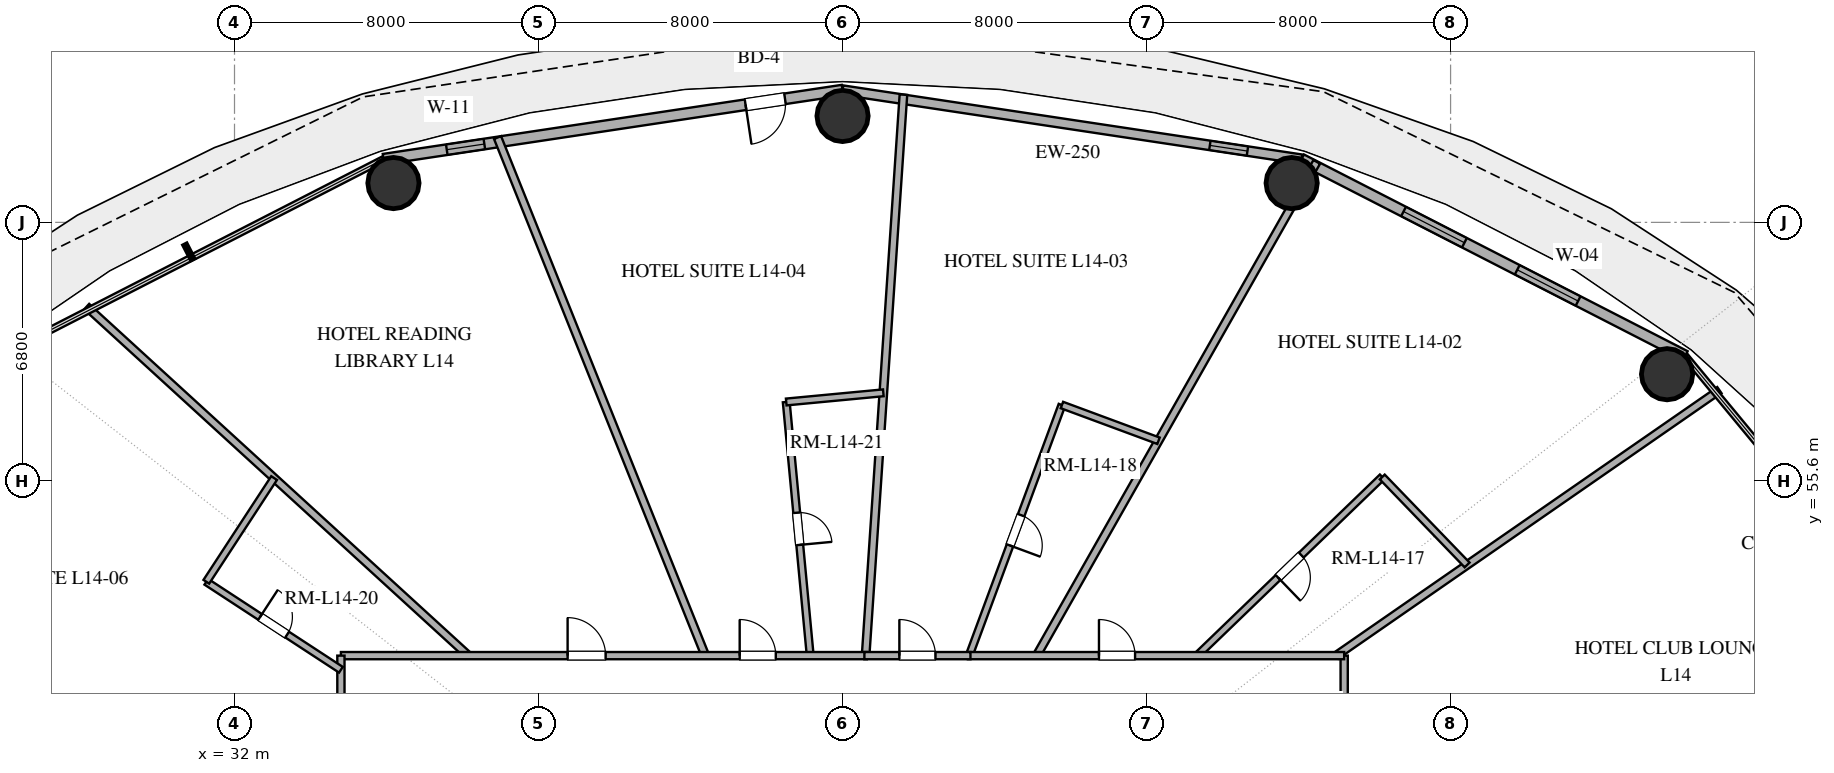
"""IFC4 building model, lengths in metres.
Left out: names, types, materials, properties, quantities, classifications, styles, units other than length and angle.
Written with IfcOpenShell. Run it as: python <this file> out.ifc"""

import sys

from ifc_helpers import new_model, si_unit, direction, frame, frame_2d, origin, origin_2d, place, context, subcontext, project, spatial, rectangle, hollow_circle, extrude, element, fill, save


model = new_model("IFC4")
c1 = context("Model", 3, precision=1e-05, world=origin(), true_north=direction((0.0, 1.0)))
c2 = subcontext(c1, "Body", "Model", "MODEL_VIEW")
j1 = project(units=[si_unit("LENGTHUNIT", "METRE"), si_unit("PLANEANGLEUNIT", "RADIAN")], contexts=[c1])
p1 = place(None, origin())
s1 = spatial("IfcSite", under=j1, at=p1, CompositionType="ELEMENT")
p2 = place(p1, origin())
s2 = spatial("IfcBuilding", under=s1, at=p2, CompositionType="ELEMENT")
p3 = place(p2, frame((0.0, 0.0, 60.6)))
s3 = spatial("IfcBuildingStorey", under=s2, at=p3, CompositionType="ELEMENT", Elevation=60.6)
for number, where, z_axis, x_axis in (
    (1, (69.697, 58.405, 0.0), (0.0, 0.0, 1.0), (1.0, 0.0, 0.0)),
    (2, (59.818, 63.434, 0.0), (0.0, 0.0, 1.0), (1.0, 0.0, 0.0)),
    (3, (48.0, 65.2, 0.0), (0.0, 0.0, 1.0), (1.0, 0.0, 0.0)),
    (4, (36.182, 63.434, 0.0), (0.0, 0.0, 1.0), (1.0, 0.0, 0.0)),
):
    element("IfcColumn", number, at=place(p3, frame(where, z_axis=z_axis, x_axis=x_axis)), inside=s3, PredefinedType="COLUMN", context=c2, shape_type="SweptSolid", body=[
        extrude(hollow_circle(Radius=0.675, WallThickness=0.036, at=origin_2d()), origin(), (0.0, 0.0, 1.0), 3.38),
    ])
p4 = place(p3, frame((70.174, 58.886, 0.0), z_axis=(0.0, 0.0, 1.0), x_axis=(-0.889853976658, 0.456245438581, 0.0)))
e5 = element("IfcWall", 5, at=p4, inside=s3, PredefinedType="SOLIDWALL", context=c2, shape_type="SweptSolid", body=[
    extrude(rectangle(XDim=11.346, YDim=0.28, at=frame_2d((5.673, 0.0))), origin(), (0.0, 0.0, 1.0), 3.38),
])
p5 = place(p4, frame((3.167, 0.0, 0.85)))
e6 = element("IfcOpeningElement", 6, at=p5, cuts=e5, PredefinedType="OPENING", context=c2, shape_type="SweptSolid", body=[
    extrude(rectangle(XDim=1.8, YDim=2.2, at=frame_2d((0.9, 1.1))), frame((0.0, 0.15, 0.0), z_axis=(0.0, -1.0, 0.0), x_axis=(1.0, 0.0, 0.0)), (0.0, 0.0, 1.0), 0.3),
])
p6 = place(p4, frame((6.529, 0.0, 0.85)))
e7 = element("IfcOpeningElement", 7, at=p6, cuts=e5, PredefinedType="OPENING", context=c2, shape_type="SweptSolid", body=[
    extrude(rectangle(XDim=1.8, YDim=2.2, at=frame_2d((0.9, 1.1))), frame((0.0, 0.15, 0.0), z_axis=(0.0, -1.0, 0.0), x_axis=(1.0, 0.0, 0.0)), (0.0, 0.0, 1.0), 0.3),
])
p7 = place(p3, frame((60.078, 64.062, 0.0), z_axis=(0.0, 0.0, 1.0), x_axis=(-0.988864835849, 0.148816452121, 0.0)))
e8 = element("IfcWall", 8, at=p7, inside=s3, PredefinedType="SOLIDWALL", context=c2, shape_type="SweptSolid", body=[
    extrude(rectangle(XDim=12.214, YDim=0.25, at=frame_2d((6.107, 0.0))), origin(), (0.0, 0.0, 1.0), 3.38),
])
p8 = place(p7, frame((1.439, 0.0, 1.42)))
e9 = element("IfcOpeningElement", 9, at=p8, cuts=e8, PredefinedType="OPENING", context=c2, shape_type="SweptSolid", body=[
    extrude(rectangle(XDim=1.0, YDim=1.05, at=frame_2d((0.5, 0.525))), frame((0.0, 0.135, 0.0), z_axis=(0.0, -1.0, 0.0), x_axis=(1.0, 0.0, 0.0)), (0.0, 0.0, 1.0), 0.27),
])
p9 = place(p3, frame((48.0, 65.88, 0.0), z_axis=(0.0, 0.0, 1.0), x_axis=(-0.988864835849, -0.148816452121, 0.0)))
e10 = element("IfcWall", 10, at=p9, inside=s3, PredefinedType="SOLIDWALL", context=c2, shape_type="SweptSolid", body=[
    extrude(rectangle(XDim=12.214, YDim=0.28, at=frame_2d((6.107, 0.0))), origin(), (0.0, 0.0, 1.0), 3.38),
])
p10 = place(p9, frame((1.531, 0.0, 0.0)))
e11 = element("IfcOpeningElement", 11, at=p10, cuts=e10, PredefinedType="OPENING", context=c2, shape_type="SweptSolid", body=[
    extrude(rectangle(XDim=1.05, YDim=2.2, at=frame_2d((0.525, 1.1))), frame((0.0, 0.15, 0.0), z_axis=(0.0, -1.0, 0.0), x_axis=(1.0, 0.0, 0.0)), (0.0, 0.0, 1.0), 0.3),
])
p11 = place(p9, frame((9.531, 0.0, 0.85)))
e12 = element("IfcOpeningElement", 12, at=p11, cuts=e10, PredefinedType="OPENING", context=c2, shape_type="SweptSolid", body=[
    extrude(rectangle(XDim=1.0, YDim=1.8, at=frame_2d((0.5, 0.9))), frame((0.0, 0.15, 0.0), z_axis=(0.0, -1.0, 0.0), x_axis=(1.0, 0.0, 0.0)), (0.0, 0.0, 1.0), 0.3),
])
p12 = place(p3, frame((44.39, 51.0, 0.0), z_axis=(0.0, 0.0, 1.0), x_axis=(-0.372301847193, 0.928111703717, 0.0)))
e13 = element("IfcWall", 13, at=p12, inside=s3, PredefinedType="PARTITIONING", context=c2, shape_type="SweptSolid", body=[
    extrude(rectangle(XDim=14.688, YDim=0.2, at=frame_2d((7.344, 0.0))), origin(), (0.0, 0.0, 1.0), 2.74),
])
p13 = place(p3, frame((19.184, 50.653, 0.0), z_axis=(0.0, 0.0, 1.0), x_axis=(0.957749889613, -0.287602414708, 0.0)))
e14 = element("IfcWall", 14, at=p13, inside=s3, PredefinedType="PARTITIONING", context=c2, shape_type="SweptSolid", body=[
    extrude(rectangle(XDim=8.8, YDim=0.2, at=frame_2d((4.4, 0.0))), origin(), (0.0, 0.0, 1.0), 2.74),
])
p14 = place(p3, frame((53.107, 51.0, 0.0), z_axis=(0.0, 0.0, 1.0), x_axis=(0.493512300658, 0.869738816599, 0.0)))
e15 = element("IfcWall", 15, at=p14, inside=s3, PredefinedType="PARTITIONING", context=c2, shape_type="SweptSolid", body=[
    extrude(rectangle(XDim=14.938, YDim=0.2, at=frame_2d((7.469, 0.0))), origin(), (0.0, 0.0, 1.0), 2.74),
])
p15 = place(p3, frame((60.991, 51.0, 0.0), z_axis=(0.0, 0.0, 1.0), x_axis=(0.821999402566, 0.569488351226, 0.0)))
e16 = element("IfcWall", 16, at=p15, inside=s3, PredefinedType="PARTITIONING", context=c2, shape_type="SweptSolid", body=[
    extrude(rectangle(XDim=12.266, YDim=0.2, at=frame_2d((6.133, 0.0))), origin(), (0.0, 0.0, 1.0), 2.74),
])
p16 = place(p3, frame((48.607, 51.0, 0.0), z_axis=(0.0, 0.0, 1.0), x_axis=(0.067284649742, 0.997733820169, 0.0)))
e17 = element("IfcWall", 17, at=p16, inside=s3, PredefinedType="PARTITIONING", context=c2, shape_type="SweptSolid", body=[
    extrude(rectangle(XDim=14.793, YDim=0.2, at=frame_2d((7.396, 0.0))), origin(), (0.0, 0.0, 1.0), 2.74),
])
p17 = place(p3, frame((53.773, 57.594, 0.0), z_axis=(0.0, 0.0, 1.0), x_axis=(-0.347170736851, -0.93780194043, 0.0)))
e18 = element("IfcWall", 18, at=p17, inside=s3, PredefinedType="PLUMBINGWALL", context=c2, shape_type="SweptSolid", body=[
    extrude(rectangle(XDim=7.031, YDim=0.18, at=frame_2d((3.516, 0.0))), origin(), (0.0, 0.0, 1.0), 2.74),
])
p18 = place(p17, frame((3.091, 0.0, 0.0)))
e19 = element("IfcOpeningElement", 19, at=p18, cuts=e18, PredefinedType="OPENING", context=c2, shape_type="SweptSolid", body=[
    extrude(rectangle(XDim=0.85, YDim=2.1, at=frame_2d((0.425, 1.05))), frame((0.0, 0.1, 0.0), z_axis=(0.0, -1.0, 0.0), x_axis=(1.0, 0.0, 0.0)), (0.0, 0.0, 1.0), 0.2),
])
p19 = place(p3, frame((38.154, 51.0, 0.0), z_axis=(0.0, 0.0, 1.0), x_axis=(-0.738119160364, 0.674670367738, 0.0)))
e20 = element("IfcWall", 20, at=p19, inside=s3, PredefinedType="PARTITIONING", context=c2, shape_type="SweptSolid", body=[
    extrude(rectangle(XDim=13.61, YDim=0.2, at=frame_2d((6.805, 0.0))), origin(), (0.0, 0.0, 1.0), 2.74),
])
p20 = place(p3, frame((61.2, 51.0, 0.0), z_axis=(0.0, 0.0, 1.0), x_axis=(0.0, -1.0, 0.0)))
e21 = element("IfcWall", 21, at=p20, inside=s3, PredefinedType="PARTITIONING", context=c2, shape_type="SweptSolid", body=[
    extrude(rectangle(XDim=12.964, YDim=0.19, at=frame_2d((6.482, 0.0))), origin(), (0.0, 0.0, 1.0), 2.74),
])
p21 = place(p20, frame((2.971, 0.0, 0.0)))
e22 = element("IfcOpeningElement", 22, at=p21, cuts=e21, PredefinedType="OPENING", context=c2, shape_type="SweptSolid", body=[
    extrude(rectangle(XDim=1.0, YDim=2.2, at=frame_2d((0.5, 1.1))), frame((0.0, 0.105, 0.0), z_axis=(0.0, -1.0, 0.0), x_axis=(1.0, 0.0, 0.0)), (0.0, 0.0, 1.0), 0.21),
])
p22 = place(p20, frame((8.344, 0.0, 0.0)))
e23 = element("IfcOpeningElement", 23, at=p22, cuts=e21, PredefinedType="OPENING", context=c2, shape_type="SweptSolid", body=[
    extrude(rectangle(XDim=0.95, YDim=2.15, at=frame_2d((0.475, 1.075))), frame((0.0, 0.105, 0.0), z_axis=(0.0, -1.0, 0.0), x_axis=(1.0, 0.0, 0.0)), (0.0, 0.0, 1.0), 0.21),
])
p23 = place(p3, frame((62.202, 55.701, 0.0), z_axis=(0.0, 0.0, 1.0), x_axis=(-0.719667322044, -0.69431905172, 0.0)))
e24 = element("IfcWall", 24, at=p23, inside=s3, PredefinedType="PLUMBINGWALL", context=c2, shape_type="SweptSolid", body=[
    extrude(rectangle(XDim=6.771, YDim=0.18, at=frame_2d((3.385, 0.0))), origin(), (0.0, 0.0, 1.0), 2.74),
])
p24 = place(p23, frame((2.96, 0.0, 0.0)))
e25 = element("IfcOpeningElement", 25, at=p24, cuts=e24, PredefinedType="OPENING", context=c2, shape_type="SweptSolid", body=[
    extrude(rectangle(XDim=0.85, YDim=2.1, at=frame_2d((0.425, 1.05))), frame((0.0, 0.1, 0.0), z_axis=(0.0, -1.0, 0.0), x_axis=(1.0, 0.0, 0.0)), (0.0, 0.0, 1.0), 0.2),
])
p25 = place(p3, frame((46.518, 57.674, 0.0), z_axis=(0.0, 0.0, 1.0), x_axis=(0.094107851527, -0.995562008255, 0.0)))
e26 = element("IfcWall", 26, at=p25, inside=s3, PredefinedType="PLUMBINGWALL", context=c2, shape_type="SweptSolid", body=[
    extrude(rectangle(XDim=6.704, YDim=0.18, at=frame_2d((3.352, 0.0))), origin(), (0.0, 0.0, 1.0), 2.74),
])
p26 = place(p25, frame((2.927, 0.0, 0.0)))
e27 = element("IfcOpeningElement", 27, at=p26, cuts=e26, PredefinedType="OPENING", context=c2, shape_type="SweptSolid", body=[
    extrude(rectangle(XDim=0.85, YDim=2.1, at=frame_2d((0.425, 1.05))), frame((0.0, 0.1, 0.0), z_axis=(0.0, -1.0, 0.0), x_axis=(1.0, 0.0, 0.0)), (0.0, 0.0, 1.0), 0.2),
])
p27 = place(p3, frame((34.8, 51.0, 0.0), z_axis=(0.0, 0.0, 1.0), x_axis=(1.0, 0.0, 0.0)))
e28 = element("IfcWall", 28, at=p27, inside=s3, PredefinedType="PARTITIONING", context=c2, shape_type="SweptSolid", body=[
    extrude(rectangle(XDim=13.839, YDim=0.19, at=frame_2d((6.919, 0.0))), origin(), (0.0, 0.0, 1.0), 2.74),
])
p28 = place(p27, frame((5.965, 0.0, 0.0)))
e29 = element("IfcOpeningElement", 29, at=p28, cuts=e28, PredefinedType="OPENING", context=c2, shape_type="SweptSolid", body=[
    extrude(rectangle(XDim=1.0, YDim=2.2, at=frame_2d((0.5, 1.1))), frame((0.0, 0.105, 0.0), z_axis=(0.0, -1.0, 0.0), x_axis=(1.0, 0.0, 0.0)), (0.0, 0.0, 1.0), 0.21),
])
p29 = place(p27, frame((10.493, 0.0, 0.0)))
e30 = element("IfcOpeningElement", 30, at=p29, cuts=e28, PredefinedType="OPENING", context=c2, shape_type="SweptSolid", body=[
    extrude(rectangle(XDim=0.95, YDim=2.15, at=frame_2d((0.475, 1.075))), frame((0.0, 0.105, 0.0), z_axis=(0.0, -1.0, 0.0), x_axis=(1.0, 0.0, 0.0)), (0.0, 0.0, 1.0), 0.21),
])
p30 = place(p3, frame((34.8, 43.728, 0.0), z_axis=(0.0, 0.0, 1.0), x_axis=(0.0, 1.0, 0.0)))
e31 = element("IfcWall", 31, at=p30, inside=s3, PredefinedType="PARTITIONING", context=c2, shape_type="SweptSolid", body=[
    extrude(rectangle(XDim=7.272, YDim=0.19, at=frame_2d((3.636, 0.0))), origin(), (0.0, 0.0, 1.0), 2.74),
])
p31 = place(p30, frame((4.096, 0.0, 0.0)))
e32 = element("IfcOpeningElement", 32, at=p31, cuts=e31, PredefinedType="OPENING", context=c2, shape_type="SweptSolid", body=[
    extrude(rectangle(XDim=0.95, YDim=2.15, at=frame_2d((0.475, 1.075))), frame((0.0, 0.105, 0.0), z_axis=(0.0, -1.0, 0.0), x_axis=(1.0, 0.0, 0.0)), (0.0, 0.0, 1.0), 0.21),
])
p32 = place(p3, frame((51.298, 51.0, 0.0), z_axis=(0.0, 0.0, 1.0), x_axis=(1.0, 0.0, 0.0)))
e33 = element("IfcWall", 33, at=p32, inside=s3, PredefinedType="PARTITIONING", context=c2, shape_type="SweptSolid", body=[
    extrude(rectangle(XDim=9.902, YDim=0.19, at=frame_2d((4.951, 0.0))), origin(), (0.0, 0.0, 1.0), 2.74),
])
p33 = place(p32, frame((3.45, 0.0, 0.0)))
e34 = element("IfcOpeningElement", 34, at=p33, cuts=e33, PredefinedType="OPENING", context=c2, shape_type="SweptSolid", body=[
    extrude(rectangle(XDim=0.95, YDim=2.15, at=frame_2d((0.475, 1.075))), frame((0.0, 0.105, 0.0), z_axis=(0.0, -1.0, 0.0), x_axis=(1.0, 0.0, 0.0)), (0.0, 0.0, 1.0), 0.21),
])
p34 = place(p3, frame((31.258, 52.944, 0.0), z_axis=(0.0, 0.0, 1.0), x_axis=(0.837031612028, -0.5471545307, 0.0)))
e35 = element("IfcWall", 35, at=p34, inside=s3, PredefinedType="PLUMBINGWALL", context=c2, shape_type="SweptSolid", body=[
    extrude(rectangle(XDim=4.231, YDim=0.18, at=frame_2d((2.116, 0.0))), origin(), (0.0, 0.0, 1.0), 2.74),
])
p35 = place(p34, frame((1.691, 0.0, 0.0)))
e36 = element("IfcOpeningElement", 36, at=p35, cuts=e35, PredefinedType="OPENING", context=c2, shape_type="SweptSolid", body=[
    extrude(rectangle(XDim=0.85, YDim=2.1, at=frame_2d((0.425, 1.05))), frame((0.0, 0.1, 0.0), z_axis=(0.0, -1.0, 0.0), x_axis=(1.0, 0.0, 0.0)), (0.0, 0.0, 1.0), 0.2),
])
p36 = place(p3, frame((33.042, 55.672, 0.0), z_axis=(0.0, 0.0, 1.0), x_axis=(-0.547176717469, -0.837017108463, 0.0)))
e37 = element("IfcWall", 37, at=p36, inside=s3, PredefinedType="PLUMBINGWALL", context=c2, shape_type="SweptSolid", body=[
    extrude(rectangle(XDim=3.26, YDim=0.18, at=frame_2d((1.63, 0.0))), origin(), (0.0, 0.0, 1.0), 2.74),
])
p37 = place(p3, frame((64.435, 53.386, 0.0), z_axis=(0.0, 0.0, 1.0), x_axis=(-0.694278833189, 0.719706121821, 0.0)))
e38 = element("IfcWall", 38, at=p37, inside=s3, PredefinedType="PLUMBINGWALL", context=c2, shape_type="SweptSolid", body=[
    extrude(rectangle(XDim=3.217, YDim=0.18, at=frame_2d((1.608, 0.0))), origin(), (0.0, 0.0, 1.0), 2.74),
])
p38 = place(p3, frame((48.575, 51.0, 0.0), z_axis=(0.0, 0.0, 1.0), x_axis=(1.0, 0.0, 0.0)))
e39 = element("IfcWall", 39, at=p38, inside=s3, PredefinedType="PARTITIONING", context=c2, shape_type="SweptSolid", body=[
    extrude(rectangle(XDim=2.791, YDim=0.19, at=frame_2d((1.396, 0.0))), origin(), (0.0, 0.0, 1.0), 2.74),
])
p39 = place(p38, frame((0.921, 0.0, 0.0)))
e40 = element("IfcOpeningElement", 40, at=p39, cuts=e39, PredefinedType="OPENING", context=c2, shape_type="SweptSolid", body=[
    extrude(rectangle(XDim=0.95, YDim=2.15, at=frame_2d((0.475, 1.075))), frame((0.0, 0.105, 0.0), z_axis=(0.0, -1.0, 0.0), x_axis=(1.0, 0.0, 0.0)), (0.0, 0.0, 1.0), 0.21),
])
p40 = place(p3, frame((56.315, 56.653, 0.0), z_axis=(0.0, 0.0, 1.0), x_axis=(-0.937805250992, 0.347161793999, 0.0)))
e41 = element("IfcWall", 41, at=p40, inside=s3, PredefinedType="PLUMBINGWALL", context=c2, shape_type="SweptSolid", body=[
    extrude(rectangle(XDim=2.71, YDim=0.18, at=frame_2d((1.355, 0.0))), origin(), (0.0, 0.0, 1.0), 2.74),
])
p41 = place(p3, frame((49.073, 57.915, 0.0), z_axis=(0.0, 0.0, 1.0), x_axis=(-0.995563205557, -0.09409518447, 0.0)))
e42 = element("IfcWall", 42, at=p41, inside=s3, PredefinedType="PLUMBINGWALL", context=c2, shape_type="SweptSolid", body=[
    extrude(rectangle(XDim=2.566, YDim=0.18, at=frame_2d((1.283, 0.0))), origin(), (0.0, 0.0, 1.0), 2.74),
])
p42 = place(p5, origin())
e43 = element("IfcWindow", 43, at=p42, inside=s3, PartitioningType="SINGLE_PANEL", PredefinedType="WINDOW", context=c2, shape_type="SweptSolid", body=[
    extrude(rectangle(XDim=1.8, YDim=2.2, at=frame_2d((0.9, 1.1))), frame((0.0, 0.03, 0.0), z_axis=(0.0, -1.0, 0.0), x_axis=(1.0, 0.0, 0.0)), (0.0, 0.0, 1.0), 0.06),
])
fill(e6, e43)
p43 = place(p6, origin())
e44 = element("IfcWindow", 44, at=p43, inside=s3, PartitioningType="SINGLE_PANEL", PredefinedType="WINDOW", context=c2, shape_type="SweptSolid", body=[
    extrude(rectangle(XDim=1.8, YDim=2.2, at=frame_2d((0.9, 1.1))), frame((0.0, 0.03, 0.0), z_axis=(0.0, -1.0, 0.0), x_axis=(1.0, 0.0, 0.0)), (0.0, 0.0, 1.0), 0.06),
])
fill(e7, e44)
p44 = place(p10, origin())
e45 = element("IfcDoor", 45, at=p44, inside=s3, OperationType="SINGLE_SWING_RIGHT", PredefinedType="DOOR", context=c2, shape_type="SweptSolid", body=[
    extrude(rectangle(XDim=1.05, YDim=2.2, at=frame_2d((0.525, 1.1))), frame((0.0, 0.025, 0.0), z_axis=(0.0, -1.0, 0.0), x_axis=(1.0, 0.0, 0.0)), (0.0, 0.0, 1.0), 0.05),
])
fill(e11, e45)
p45 = place(p11, origin())
e46 = element("IfcWindow", 46, at=p45, inside=s3, PartitioningType="SINGLE_PANEL", PredefinedType="WINDOW", context=c2, shape_type="SweptSolid", body=[
    extrude(rectangle(XDim=1.0, YDim=1.8, at=frame_2d((0.5, 0.9))), frame((0.0, 0.03, 0.0), z_axis=(0.0, -1.0, 0.0), x_axis=(1.0, 0.0, 0.0)), (0.0, 0.0, 1.0), 0.06),
])
fill(e12, e46)
p46 = place(p8, origin())
e47 = element("IfcWindow", 47, at=p46, inside=s3, PartitioningType="SINGLE_PANEL", PredefinedType="WINDOW", context=c2, shape_type="SweptSolid", body=[
    extrude(rectangle(XDim=1.0, YDim=1.05, at=frame_2d((0.5, 0.525))), frame((0.0, 0.03, 0.0), z_axis=(0.0, -1.0, 0.0), x_axis=(1.0, 0.0, 0.0)), (0.0, 0.0, 1.0), 0.06),
])
fill(e9, e47)
p47 = place(p18, origin())
e48 = element("IfcDoor", 48, at=p47, inside=s3, OperationType="SINGLE_SWING_RIGHT", PredefinedType="DOOR", context=c2, shape_type="SweptSolid", body=[
    extrude(rectangle(XDim=0.85, YDim=2.1, at=frame_2d((0.425, 1.05))), frame((0.0, 0.025, 0.0), z_axis=(0.0, -1.0, 0.0), x_axis=(1.0, 0.0, 0.0)), (0.0, 0.0, 1.0), 0.05),
])
fill(e19, e48)
p48 = place(p24, origin())
e49 = element("IfcDoor", 49, at=p48, inside=s3, OperationType="SINGLE_SWING_RIGHT", PredefinedType="DOOR", context=c2, shape_type="SweptSolid", body=[
    extrude(rectangle(XDim=0.85, YDim=2.1, at=frame_2d((0.425, 1.05))), frame((0.0, 0.025, 0.0), z_axis=(0.0, -1.0, 0.0), x_axis=(1.0, 0.0, 0.0)), (0.0, 0.0, 1.0), 0.05),
])
fill(e25, e49)
p49 = place(p26, origin())
e50 = element("IfcDoor", 50, at=p49, inside=s3, OperationType="SINGLE_SWING_RIGHT", PredefinedType="DOOR", context=c2, shape_type="SweptSolid", body=[
    extrude(rectangle(XDim=0.85, YDim=2.1, at=frame_2d((0.425, 1.05))), frame((0.0, 0.025, 0.0), z_axis=(0.0, -1.0, 0.0), x_axis=(1.0, 0.0, 0.0)), (0.0, 0.0, 1.0), 0.05),
])
fill(e27, e50)
p50 = place(p28, origin())
e51 = element("IfcDoor", 51, at=p50, inside=s3, OperationType="SINGLE_SWING_LEFT", PredefinedType="DOOR", context=c2, shape_type="SweptSolid", body=[
    extrude(rectangle(XDim=1.0, YDim=2.2, at=frame_2d((0.5, 1.1))), frame((0.0, 0.025, 0.0), z_axis=(0.0, -1.0, 0.0), x_axis=(1.0, 0.0, 0.0)), (0.0, 0.0, 1.0), 0.05),
])
fill(e29, e51)
p51 = place(p29, origin())
e52 = element("IfcDoor", 52, at=p51, inside=s3, OperationType="SINGLE_SWING_LEFT", PredefinedType="DOOR", context=c2, shape_type="SweptSolid", body=[
    extrude(rectangle(XDim=0.95, YDim=2.15, at=frame_2d((0.475, 1.075))), frame((0.0, 0.025, 0.0), z_axis=(0.0, -1.0, 0.0), x_axis=(1.0, 0.0, 0.0)), (0.0, 0.0, 1.0), 0.05),
])
fill(e30, e52)
p52 = place(p33, origin())
e53 = element("IfcDoor", 53, at=p52, inside=s3, OperationType="SINGLE_SWING_LEFT", PredefinedType="DOOR", context=c2, shape_type="SweptSolid", body=[
    extrude(rectangle(XDim=0.95, YDim=2.15, at=frame_2d((0.475, 1.075))), frame((0.0, 0.025, 0.0), z_axis=(0.0, -1.0, 0.0), x_axis=(1.0, 0.0, 0.0)), (0.0, 0.0, 1.0), 0.05),
])
fill(e34, e53)
p53 = place(p35, origin())
e54 = element("IfcDoor", 54, at=p53, inside=s3, OperationType="SINGLE_SWING_LEFT", PredefinedType="DOOR", context=c2, shape_type="SweptSolid", body=[
    extrude(rectangle(XDim=0.85, YDim=2.1, at=frame_2d((0.425, 1.05))), frame((0.0, 0.025, 0.0), z_axis=(0.0, -1.0, 0.0), x_axis=(1.0, 0.0, 0.0)), (0.0, 0.0, 1.0), 0.05),
])
fill(e36, e54)
p54 = place(p39, origin())
e55 = element("IfcDoor", 55, at=p54, inside=s3, OperationType="SINGLE_SWING_LEFT", PredefinedType="DOOR", context=c2, shape_type="SweptSolid", body=[
    extrude(rectangle(XDim=0.95, YDim=2.15, at=frame_2d((0.475, 1.075))), frame((0.0, 0.025, 0.0), z_axis=(0.0, -1.0, 0.0), x_axis=(1.0, 0.0, 0.0)), (0.0, 0.0, 1.0), 0.05),
])
fill(e40, e55)
save(model, sys.argv[1])
